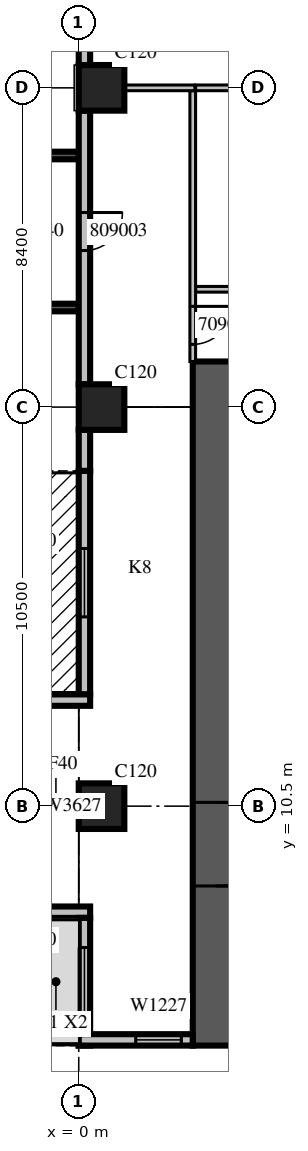
"""IFC4 building model, lengths in metres.
Left out: names, types, materials, properties, quantities, classifications, styles, units other than length and angle.
Written with IfcOpenShell. Run it as: python <this file> out.ifc"""

import sys

from ifc_helpers import new_model, si_unit, direction, frame, frame_2d, origin, origin_2d, place, context, subcontext, project, spatial, rectangle, extrude, source, transform, mapped, element, fill, save


model = new_model("IFC4")
c1 = context("Model", 3, precision=1e-05, world=origin(), true_north=direction((0.0, 1.0)))
c2 = subcontext(c1, "Body", "Model", "MODEL_VIEW")
j1 = project(units=[si_unit("LENGTHUNIT", "METRE"), si_unit("PLANEANGLEUNIT", "RADIAN")], contexts=[c1])
p1 = place(None, origin())
s1 = spatial("IfcSite", under=j1, at=p1, CompositionType="ELEMENT")
p2 = place(p1, origin())
s2 = spatial("IfcBuilding", under=s1, at=p2, CompositionType="ELEMENT")
p3 = place(p2, frame((0.0, 0.0, 48.9)))
s3 = spatial("IfcBuildingStorey", under=s2, at=p3, CompositionType="ELEMENT", Elevation=48.9)
m1 = source(origin(), c2, "Body", "SweptSolid", [
    extrude(rectangle(XDim=1.2, YDim=1.2, at=origin_2d()), origin(), (0.0, 0.0, 1.0), 4.2),
])
for number, where, z_axis, x_axis in (
    (1, (0.6, 10.5, 0.0), (0.0, 0.0, 1.0), (1.0, 0.0, 0.0)),
    (2, (0.6, 21.0, 0.0), (0.0, 0.0, 1.0), (1.0, 0.0, 0.0)),
    (3, (0.6, 29.4, 0.0), (0.0, 0.0, 1.0), (1.0, 0.0, 0.0)),
):
    element("IfcColumn", number, at=place(p3, frame(where, z_axis=z_axis, x_axis=x_axis)), inside=s3, PredefinedType="COLUMN", context=c2, shape_type="MappedRepresentation", body=[
        mapped(m1, transform((0.0, 0.0, 0.0), scale=1.0)),
    ])
m2 = source(origin(), c2, "Body", "SweptSolid", [
    extrude(rectangle(XDim=18.0, YDim=1.2, at=frame_2d((9.0, 0.0))), origin(), (0.0, 0.0, 1.0), 4.2),
])
p4 = place(p3, frame((3.6, 4.2, 0.0), z_axis=(0.0, 0.0, 1.0), x_axis=(0.0, 1.0, 0.0)))
e4 = element("IfcWall", 4, at=p4, inside=s3, PredefinedType="SHEAR", context=c2, shape_type="MappedRepresentation", body=[
    mapped(m2, transform((0.0, 0.0, 0.0), scale=1.0)),
])
m3 = source(origin(), c2, "Body", "SweptSolid", [
    extrude(rectangle(XDim=2.2, YDim=2.1, at=frame_2d((1.1, 1.05))), frame((0.0, 0.61, 0.0), z_axis=(0.0, -1.0, 0.0), x_axis=(1.0, 0.0, 0.0)), (0.0, 0.0, 1.0), 1.22),
])
p5 = place(p4, frame((4.2, 0.0, 0.0)))
e5 = element("IfcOpeningElement", 5, at=p5, cuts=e4, PredefinedType="OPENING", context=c2, shape_type="MappedRepresentation", body=[
    mapped(m3, transform((0.0, 0.0, 0.0), scale=1.0)),
])
m4 = source(origin(), c2, "Body", "SweptSolid", [
    extrude(rectangle(XDim=3.9, YDim=0.2, at=frame_2d((1.95, 0.0))), origin(), (0.0, 0.0, 1.0), 3.8),
])
p6 = place(p3, frame((0.0, 27.62, 0.0), z_axis=(0.0, 0.0, 1.0), x_axis=(-1.0, 0.0, 0.0)))
e6 = element("IfcWall", 6, at=p6, inside=s3, PredefinedType="SOLIDWALL", context=c2, shape_type="MappedRepresentation", body=[
    mapped(m4, transform((0.0, 0.0, 0.0), scale=1.0)),
])
m5 = source(origin(), c2, "Body", "SweptSolid", [
    extrude(rectangle(XDim=2.4, YDim=2.7, at=frame_2d((1.2, 1.35))), frame((0.0, 0.11, 0.0), z_axis=(0.0, -1.0, 0.0), x_axis=(1.0, 0.0, 0.0)), (0.0, 0.0, 1.0), 0.22),
])
p7 = place(p6, frame((0.75, 0.0, 0.6)))
e7 = element("IfcOpeningElement", 7, at=p7, cuts=e6, PredefinedType="OPENING", context=c2, shape_type="MappedRepresentation", body=[
    mapped(m5, transform((0.0, 0.0, 0.0), scale=1.0)),
])
p8 = place(p3, frame((0.0, 23.62, 0.0), z_axis=(0.0, 0.0, 1.0), x_axis=(-1.0, 0.0, 0.0)))
e8 = element("IfcWall", 8, at=p8, inside=s3, PredefinedType="SOLIDWALL", context=c2, shape_type="MappedRepresentation", body=[
    mapped(m4, transform((0.0, 0.0, 0.0), scale=1.0)),
])
p9 = place(p8, frame((0.75, 0.0, 0.6)))
e9 = element("IfcOpeningElement", 9, at=p9, cuts=e8, PredefinedType="OPENING", context=c2, shape_type="MappedRepresentation", body=[
    mapped(m5, transform((0.0, 0.0, 0.0), scale=1.0)),
])
m6 = source(origin(), c2, "Body", "SweptSolid", [
    extrude(rectangle(XDim=7.2, YDim=0.3, at=frame_2d((3.6, 0.0))), origin(), (0.0, 0.0, 1.0), 3.8),
])
p10 = place(p3, frame((0.15, 37.2, 0.0), z_axis=(0.0, 0.0, 1.0), x_axis=(0.0, -1.0, 0.0)))
e10 = element("IfcWall", 10, at=p10, inside=s3, PredefinedType="STANDARD", context=c2, shape_type="MappedRepresentation", body=[
    mapped(m6, transform((0.0, 0.0, 0.0), scale=1.0)),
])
m7 = source(origin(), c2, "Body", "SweptSolid", [
    extrude(rectangle(XDim=1.8, YDim=2.7, at=frame_2d((0.9, 1.35))), frame((0.0, 0.16, 0.0), z_axis=(0.0, -1.0, 0.0), x_axis=(1.0, 0.0, 0.0)), (0.0, 0.0, 1.0), 0.32),
])
p11 = place(p10, frame((0.738, 0.0, 0.6)))
e11 = element("IfcOpeningElement", 11, at=p11, cuts=e10, PredefinedType="OPENING", context=c2, shape_type="MappedRepresentation", body=[
    mapped(m7, transform((0.0, 0.0, 0.0), scale=1.0)),
])
m8 = source(origin(), c2, "Body", "SweptSolid", [
    extrude(rectangle(XDim=2.4, YDim=2.7, at=frame_2d((1.2, 1.35))), frame((0.0, 0.16, 0.0), z_axis=(0.0, -1.0, 0.0), x_axis=(1.0, 0.0, 0.0)), (0.0, 0.0, 1.0), 0.32),
])
p12 = place(p10, frame((3.7, 0.0, 0.6)))
e12 = element("IfcOpeningElement", 12, at=p12, cuts=e10, PredefinedType="OPENING", context=c2, shape_type="MappedRepresentation", body=[
    mapped(m8, transform((0.0, 0.0, 0.0), scale=1.0)),
])
p13 = place(p3, frame((0.15, 28.8, 0.0), z_axis=(0.0, 0.0, 1.0), x_axis=(0.0, -1.0, 0.0)))
e13 = element("IfcWall", 13, at=p13, inside=s3, PredefinedType="STANDARD", context=c2, shape_type="MappedRepresentation", body=[
    mapped(m6, transform((0.0, 0.0, 0.0), scale=1.0)),
])
m9 = source(origin(), c2, "Body", "SweptSolid", [
    extrude(rectangle(XDim=1.0, YDim=2.1, at=frame_2d((0.5, 1.05))), frame((0.0, 0.16, 0.0), z_axis=(0.0, -1.0, 0.0), x_axis=(1.0, 0.0, 0.0)), (0.0, 0.0, 1.0), 0.32),
])
p14 = place(p13, frame((2.68, 0.0, 0.0)))
e14 = element("IfcOpeningElement", 14, at=p14, cuts=e13, PredefinedType="OPENING", context=c2, shape_type="MappedRepresentation", body=[
    mapped(m9, transform((0.0, 0.0, 0.0), scale=1.0)),
])
m10 = source(origin(), c2, "Body", "SweptSolid", [
    extrude(rectangle(XDim=1.08, YDim=0.3, at=frame_2d((0.54, 0.0))), origin(), (0.0, 0.0, 1.0), 3.8),
])
p15 = place(p3, frame((0.15, 20.4, 0.0), z_axis=(0.0, 0.0, 1.0), x_axis=(0.0, -1.0, 0.0)))
e15 = element("IfcWall", 15, at=p15, inside=s3, PredefinedType="STANDARD", context=c2, shape_type="MappedRepresentation", body=[
    mapped(m10, transform((0.0, 0.0, 0.0), scale=1.0)),
])
m11 = source(origin(), c2, "Body", "SweptSolid", [
    extrude(rectangle(XDim=5.88, YDim=0.3, at=frame_2d((2.94, 0.0))), origin(), (0.0, 0.0, 1.0), 3.8),
])
p16 = place(p3, frame((0.15, 19.32, 0.0), z_axis=(0.0, 0.0, 1.0), x_axis=(0.0, -1.0, 0.0)))
e16 = element("IfcWall", 16, at=p16, inside=s3, PredefinedType="STANDARD", context=c2, shape_type="MappedRepresentation", body=[
    mapped(m11, transform((0.0, 0.0, 0.0), scale=1.0)),
])
m12 = source(origin(), c2, "Body", "SweptSolid", [
    extrude(rectangle(XDim=1.8, YDim=2.4, at=frame_2d((0.9, 1.2))), frame((0.0, 0.16, 0.0), z_axis=(0.0, -1.0, 0.0), x_axis=(1.0, 0.0, 0.0)), (0.0, 0.0, 1.0), 0.32),
])
p17 = place(p16, frame((2.04, 0.0, 0.0)))
e17 = element("IfcOpeningElement", 17, at=p17, cuts=e16, PredefinedType="OPENING", context=c2, shape_type="MappedRepresentation", body=[
    mapped(m12, transform((0.0, 0.0, 0.0), scale=1.0)),
])
m13 = source(origin(), c2, "Body", "SweptSolid", [
    extrude(rectangle(XDim=1.2, YDim=0.3, at=frame_2d((0.6, 0.0))), origin(), (0.0, 0.0, 1.0), 3.8),
])
for number, where, z_axis, x_axis in (
    (18, (0.3, 13.29, 0.0), (0.0, 0.0, 1.0), (-1.0, 0.0, 0.0)),
    (19, (0.3, 7.71, 0.0), (0.0, 0.0, 1.0), (-1.0, 0.0, 0.0)),
):
    element("IfcWall", number, at=place(p3, frame(where, z_axis=z_axis, x_axis=x_axis)), inside=s3, PredefinedType="STANDARD", context=c2, shape_type="MappedRepresentation", body=[
        mapped(m13, transform((0.0, 0.0, 0.0), scale=1.0)),
    ])
m14 = source(origin(), c2, "Body", "SweptSolid", [
    extrude(rectangle(XDim=3.36, YDim=0.3, at=frame_2d((1.68, 0.0))), origin(), (0.0, 0.0, 1.0), 3.8),
])
p18 = place(p3, frame((0.15, 7.56, 0.0), z_axis=(0.0, 0.0, 1.0), x_axis=(0.0, -1.0, 0.0)))
e20 = element("IfcWall", 20, at=p18, inside=s3, PredefinedType="STANDARD", context=c2, shape_type="MappedRepresentation", body=[
    mapped(m14, transform((0.0, 0.0, 0.0), scale=1.0)),
])
p19 = place(p18, frame((0.78, 0.0, 0.0)))
e21 = element("IfcOpeningElement", 21, at=p19, cuts=e20, PredefinedType="OPENING", context=c2, shape_type="MappedRepresentation", body=[
    mapped(m12, transform((0.0, 0.0, 0.0), scale=1.0)),
])
m15 = source(origin(), c2, "Body", "SweptSolid", [
    extrude(rectangle(XDim=3.0, YDim=0.3, at=frame_2d((1.5, 0.0))), origin(), (0.0, 0.0, 1.0), 3.8),
])
p20 = place(p3, frame((0.0, 4.35, 0.0), z_axis=(0.0, 0.0, 1.0), x_axis=(1.0, 0.0, 0.0)))
e22 = element("IfcWall", 22, at=p20, inside=s3, PredefinedType="STANDARD", context=c2, shape_type="MappedRepresentation", body=[
    mapped(m15, transform((0.0, 0.0, 0.0), scale=1.0)),
])
m16 = source(origin(), c2, "Body", "SweptSolid", [
    extrude(rectangle(XDim=1.2, YDim=2.7, at=frame_2d((0.6, 1.35))), frame((0.0, 0.16, 0.0), z_axis=(0.0, -1.0, 0.0), x_axis=(1.0, 0.0, 0.0)), (0.0, 0.0, 1.0), 0.32),
])
p21 = place(p20, frame((1.5, 0.0, 0.6)))
e23 = element("IfcOpeningElement", 23, at=p21, cuts=e22, PredefinedType="OPENING", context=c2, shape_type="MappedRepresentation", body=[
    mapped(m16, transform((0.0, 0.0, 0.0), scale=1.0)),
])
m17 = source(origin(), c2, "Body", "SweptSolid", [
    extrude(rectangle(XDim=11.925, YDim=0.15, at=frame_2d((5.963, 0.0))), origin(), (0.0, 0.0, 1.0), 3.8),
])
p22 = place(p3, frame((3.075, 24.1, 0.0), z_axis=(0.0, 0.0, 1.0), x_axis=(1.0, 0.0, 0.0)))
e24 = element("IfcWall", 24, at=p22, inside=s3, PredefinedType="PARTITIONING", context=c2, shape_type="MappedRepresentation", body=[
    mapped(m17, transform((0.0, 0.0, 0.0), scale=1.0)),
])
m18 = source(origin(), c2, "Body", "SweptSolid", [
    extrude(rectangle(XDim=0.9, YDim=2.1, at=frame_2d((0.45, 1.05))), frame((0.0, 0.085, 0.0), z_axis=(0.0, -1.0, 0.0), x_axis=(1.0, 0.0, 0.0)), (0.0, 0.0, 1.0), 0.17),
])
p23 = place(p22, frame((1.462, 0.0, 0.0)))
e25 = element("IfcOpeningElement", 25, at=p23, cuts=e24, PredefinedType="OPENING", context=c2, shape_type="MappedRepresentation", body=[
    mapped(m18, transform((0.0, 0.0, 0.0), scale=1.0)),
])
p24 = place(p22, frame((8.3, 0.0, 0.0)))
e26 = element("IfcOpeningElement", 26, at=p24, cuts=e24, PredefinedType="OPENING", context=c2, shape_type="MappedRepresentation", body=[
    mapped(m18, transform((0.0, 0.0, 0.0), scale=1.0)),
])
m19 = source(origin(), c2, "Body", "SweptSolid", [
    extrude(rectangle(XDim=6.826, YDim=0.15, at=frame_2d((3.413, 0.0))), origin(), (0.0, 0.0, 1.0), 3.8),
])
p25 = place(p3, frame((9.901, 29.4, 0.0), z_axis=(0.0, 0.0, 1.0), x_axis=(-1.0, 0.0, 0.0)))
e27 = element("IfcWall", 27, at=p25, inside=s3, PredefinedType="PARTITIONING", context=c2, shape_type="MappedRepresentation", body=[
    mapped(m19, transform((0.0, 0.0, 0.0), scale=1.0)),
])
m20 = source(origin(), c2, "Body", "SweptSolid", [
    extrude(rectangle(XDim=7.125, YDim=0.15, at=frame_2d((3.562, 0.0))), origin(), (0.0, 0.0, 1.0), 3.8),
])
p26 = place(p3, frame((3.0, 29.325, 0.0), z_axis=(0.0, 0.0, 1.0), x_axis=(0.0, -1.0, 0.0)))
e28 = element("IfcWall", 28, at=p26, inside=s3, PredefinedType="PARTITIONING", context=c2, shape_type="MappedRepresentation", body=[
    mapped(m20, transform((0.0, 0.0, 0.0), scale=1.0)),
])
m21 = source(origin(), c2, "Body", "SweptSolid", [
    extrude(rectangle(XDim=1.0, YDim=2.1, at=frame_2d((0.5, 1.05))), frame((0.0, 0.085, 0.0), z_axis=(0.0, -1.0, 0.0), x_axis=(1.0, 0.0, 0.0)), (0.0, 0.0, 1.0), 0.17),
])
p27 = place(p26, frame((5.675, 0.0, 0.0)))
e29 = element("IfcOpeningElement", 29, at=p27, cuts=e28, PredefinedType="OPENING", context=c2, shape_type="MappedRepresentation", body=[
    mapped(m21, transform((0.0, 0.0, 0.0), scale=1.0)),
])
m22 = source(origin(), c2, "Body", "SweptSolid", [
    extrude(rectangle(XDim=1.856, YDim=0.15, at=frame_2d((0.928, 0.0))), origin(), (0.0, 0.0, 1.0), 3.8),
])
p28 = place(p3, frame((3.055, 29.4, 0.0), z_axis=(0.0, 0.0, 1.0), x_axis=(-1.0, 0.0, 0.0)))
e30 = element("IfcWall", 30, at=p28, inside=s3, PredefinedType="PARTITIONING", context=c2, shape_type="MappedRepresentation", body=[
    mapped(m22, transform((0.0, 0.0, 0.0), scale=1.0)),
])
m23 = source(origin(), c2, "Body", "SweptSolid", [
    extrude(rectangle(XDim=1.8, YDim=2.4, at=frame_2d((0.9, 1.2))), frame((0.0, 0.025, 0.0), z_axis=(0.0, -1.0, 0.0), x_axis=(1.0, 0.0, 0.0)), (0.0, 0.0, 1.0), 0.05),
])
p29 = place(p17, origin())
e31 = element("IfcDoor", 31, at=p29, inside=s3, OperationType="SLIDING_TO_LEFT", PredefinedType="DOOR", context=c2, shape_type="MappedRepresentation", body=[
    mapped(m23, transform((0.0, 0.0, 0.0), scale=1.0)),
])
fill(e17, e31)
p30 = place(p19, origin())
e32 = element("IfcDoor", 32, at=p30, inside=s3, OperationType="SLIDING_TO_LEFT", PredefinedType="DOOR", context=c2, shape_type="MappedRepresentation", body=[
    mapped(m23, transform((0.0, 0.0, 0.0), scale=1.0)),
])
fill(e21, e32)
m24 = source(origin(), c2, "Body", "SweptSolid", [
    extrude(rectangle(XDim=1.2, YDim=2.7, at=frame_2d((0.6, 1.35))), frame((0.0, 0.03, 0.0), z_axis=(0.0, -1.0, 0.0), x_axis=(1.0, 0.0, 0.0)), (0.0, 0.0, 1.0), 0.06),
])
p31 = place(p21, origin())
e33 = element("IfcWindow", 33, at=p31, inside=s3, PartitioningType="SINGLE_PANEL", PredefinedType="WINDOW", context=c2, shape_type="MappedRepresentation", body=[
    mapped(m24, transform((0.0, 0.0, 0.0), scale=1.0)),
])
fill(e23, e33)
m25 = source(origin(), c2, "Body", "SweptSolid", [
    extrude(rectangle(XDim=2.2, YDim=2.1, at=frame_2d((1.1, 1.05))), frame((0.0, 0.025, 0.0), z_axis=(0.0, -1.0, 0.0), x_axis=(1.0, 0.0, 0.0)), (0.0, 0.0, 1.0), 0.05),
])
p32 = place(p5, origin())
e34 = element("IfcDoor", 34, at=p32, inside=s3, OperationType="DOUBLE_DOOR_SINGLE_SWING", PredefinedType="DOOR", context=c2, shape_type="MappedRepresentation", body=[
    mapped(m25, transform((0.0, 0.0, 0.0), scale=1.0)),
])
fill(e5, e34)
m26 = source(origin(), c2, "Body", "SweptSolid", [
    extrude(rectangle(XDim=1.0, YDim=2.1, at=frame_2d((0.5, 1.05))), frame((0.0, 0.025, 0.0), z_axis=(0.0, -1.0, 0.0), x_axis=(1.0, 0.0, 0.0)), (0.0, 0.0, 1.0), 0.05),
])
p33 = place(p27, origin())
e35 = element("IfcDoor", 35, at=p33, inside=s3, OperationType="SINGLE_SWING_LEFT", PredefinedType="DOOR", context=c2, shape_type="MappedRepresentation", body=[
    mapped(m26, transform((0.0, 0.0, 0.0), scale=1.0)),
])
fill(e29, e35)
p34 = place(p14, origin())
e36 = element("IfcDoor", 36, at=p34, inside=s3, OperationType="SINGLE_SWING_LEFT", PredefinedType="DOOR", context=c2, shape_type="MappedRepresentation", body=[
    mapped(m26, transform((0.0, 0.0, 0.0), scale=1.0)),
])
fill(e14, e36)
save(model, sys.argv[1])
